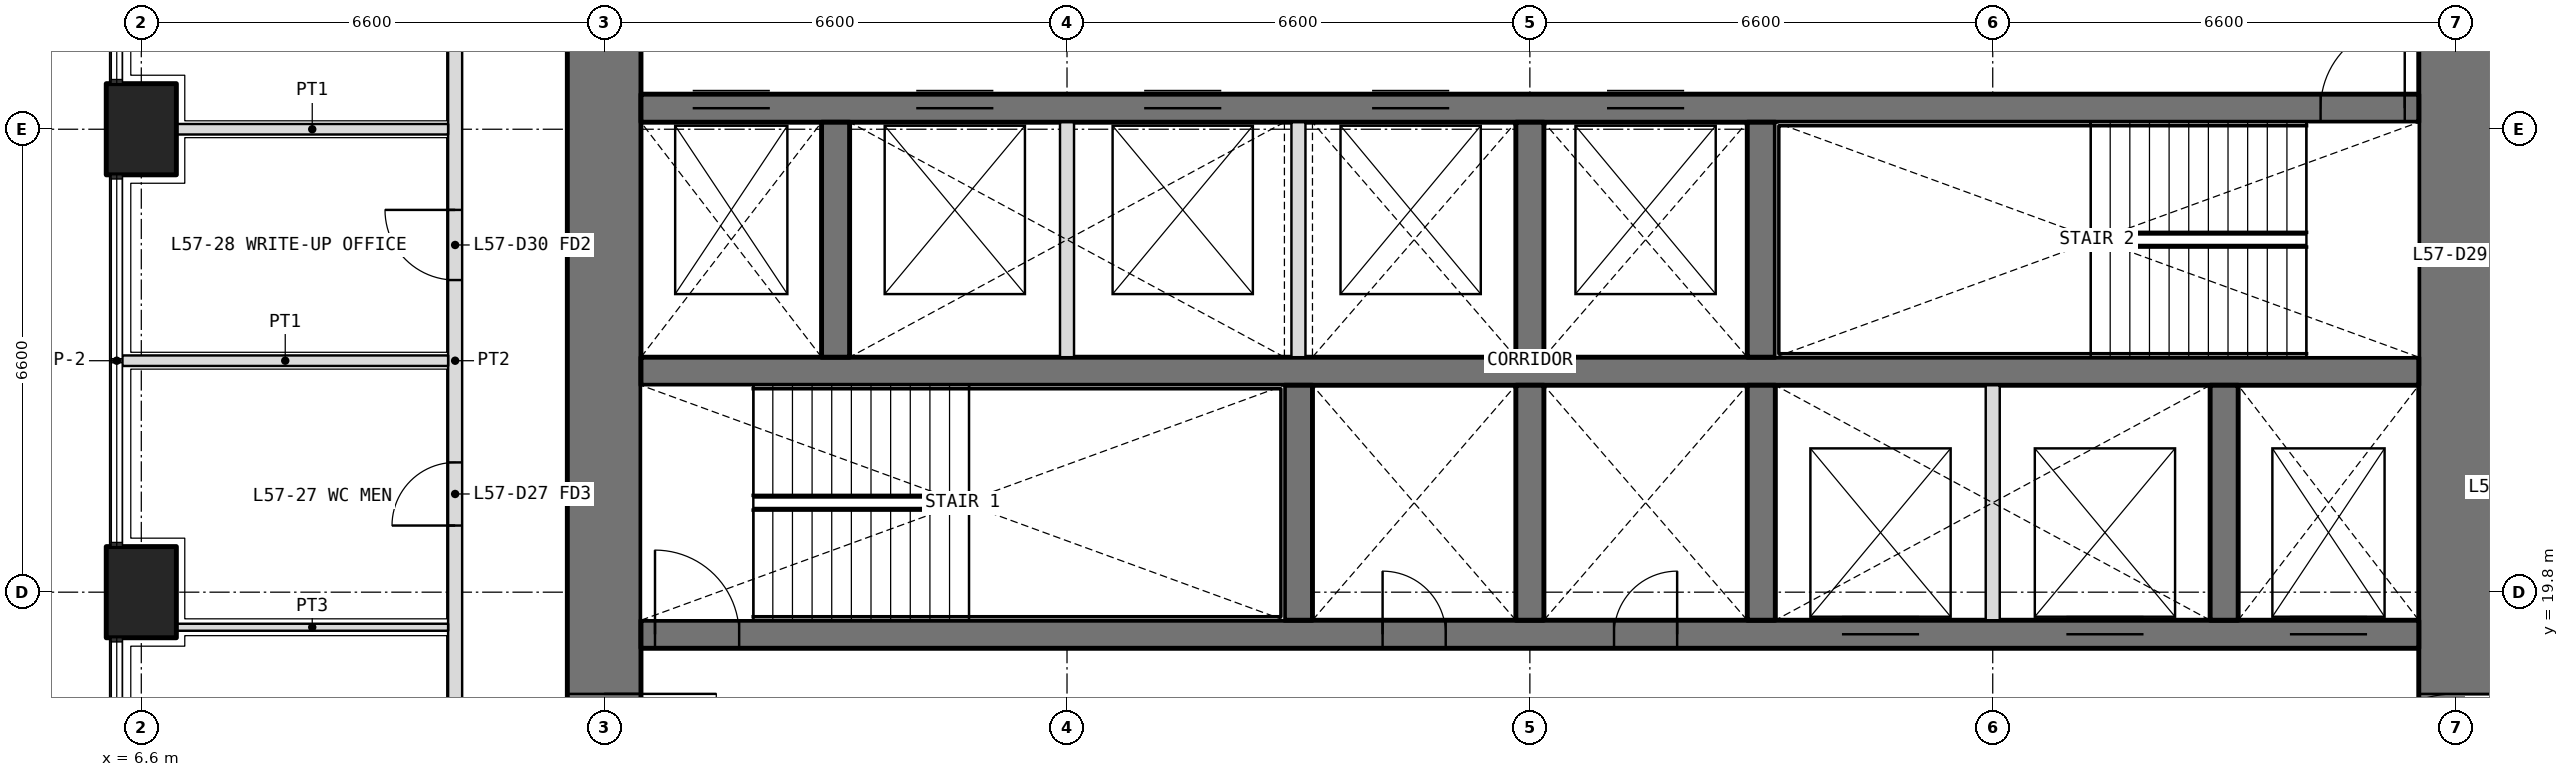
"""IFC4 building model, lengths in metres.
Left out: names, types, materials, properties, quantities, classifications, styles, units other than length and angle.
Written with IfcOpenShell. Run it as: python <this file> out.ifc"""

import sys

from ifc_helpers import new_model, si_unit, direction, frame, frame_2d, origin, origin_2d, place, context, subcontext, project, spatial, rectangle, extrude, element, fill, save


model = new_model("IFC4")
c1 = context("Model", 3, precision=1e-05, world=origin(), true_north=direction((0.0, 1.0)))
c2 = subcontext(c1, "Body", "Model", "MODEL_VIEW")
j1 = project(units=[si_unit("LENGTHUNIT", "METRE"), si_unit("PLANEANGLEUNIT", "RADIAN")], contexts=[c1])
p1 = place(None, origin())
s1 = spatial("IfcSite", under=j1, at=p1, CompositionType="ELEMENT")
p2 = place(p1, origin())
s2 = spatial("IfcBuilding", under=s1, at=p2, CompositionType="ELEMENT")
p3 = place(p2, frame((0.0, 0.0, 250.2)))
s3 = spatial("IfcBuildingStorey", under=s2, at=p3, CompositionType="ELEMENT", Elevation=250.2)
for number, where, z_axis, x_axis in (
    (1, (6.6, 19.8, 0.0), (0.0, 0.0, 1.0), (0.0, 1.0, 0.0)),
    (2, (6.6, 26.4, 0.0), (0.0, 0.0, 1.0), (0.0, 1.0, 0.0)),
):
    element("IfcColumn", number, at=place(p3, frame(where, z_axis=z_axis, x_axis=x_axis)), inside=s3, PredefinedType="COLUMN", context=c2, shape_type="SweptSolid", body=[
        extrude(rectangle(XDim=1.3, YDim=1.0, at=origin_2d()), origin(), (0.0, 0.0, 1.0), 4.2),
    ])
p4 = place(p3, frame((39.6, 13.725, 0.0), z_axis=(0.0, 0.0, 1.0), x_axis=(0.0, 1.0, 0.0)))
e3 = element("IfcWall", 3, at=p4, inside=s3, PredefinedType="SHEAR", context=c2, shape_type="SweptSolid", body=[
    extrude(rectangle(XDim=18.75, YDim=1.05, at=frame_2d((9.375, 0.0))), origin(), (0.0, 0.0, 1.0), 4.2),
])
p5 = place(p4, frame((3.025, 0.0, 0.0)))
e4 = element("IfcOpeningElement", 4, at=p5, cuts=e3, PredefinedType="OPENING", context=c2, shape_type="SweptSolid", body=[
    extrude(rectangle(XDim=1.6, YDim=2.1, at=frame_2d((0.8, 1.05))), frame((0.0, 0.535, 0.0), z_axis=(0.0, -1.0, 0.0), x_axis=(1.0, 0.0, 0.0)), (0.0, 0.0, 1.0), 1.07),
])
p6 = place(p4, frame((13.825, 0.0, 0.0)))
e5 = element("IfcOpeningElement", 5, at=p6, cuts=e3, PredefinedType="OPENING", context=c2, shape_type="SweptSolid", body=[
    extrude(rectangle(XDim=1.6, YDim=2.1, at=frame_2d((0.8, 1.05))), frame((0.0, 0.535, 0.0), z_axis=(0.0, -1.0, 0.0), x_axis=(1.0, 0.0, 0.0)), (0.0, 0.0, 1.0), 1.07),
])
p7 = place(p3, frame((13.2, 32.475, 0.0), z_axis=(0.0, 0.0, 1.0), x_axis=(0.0, -1.0, 0.0)))
e6 = element("IfcWall", 6, at=p7, inside=s3, PredefinedType="SHEAR", context=c2, shape_type="SweptSolid", body=[
    extrude(rectangle(XDim=18.75, YDim=1.05, at=frame_2d((9.375, 0.0))), origin(), (0.0, 0.0, 1.0), 4.2),
])
p8 = place(p7, frame((14.125, 0.0, 0.0)))
e7 = element("IfcOpeningElement", 7, at=p8, cuts=e6, PredefinedType="OPENING", context=c2, shape_type="SweptSolid", body=[
    extrude(rectangle(XDim=1.6, YDim=2.1, at=frame_2d((0.8, 1.05))), frame((0.0, 0.535, 0.0), z_axis=(0.0, -1.0, 0.0), x_axis=(1.0, 0.0, 0.0)), (0.0, 0.0, 1.0), 1.07),
])
p9 = place(p7, frame((3.325, 0.0, 0.0)))
e8 = element("IfcOpeningElement", 8, at=p9, cuts=e6, PredefinedType="OPENING", context=c2, shape_type="SweptSolid", body=[
    extrude(rectangle(XDim=1.6, YDim=2.1, at=frame_2d((0.8, 1.05))), frame((0.0, 0.535, 0.0), z_axis=(0.0, -1.0, 0.0), x_axis=(1.0, 0.0, 0.0)), (0.0, 0.0, 1.0), 1.07),
])
p10 = place(p3, frame((13.725, 19.2, 0.0), z_axis=(0.0, 0.0, 1.0), x_axis=(1.0, 0.0, 0.0)))
e9 = element("IfcWall", 9, at=p10, inside=s3, PredefinedType="SHEAR", context=c2, shape_type="SweptSolid", body=[
    extrude(rectangle(XDim=25.35, YDim=0.4, at=frame_2d((12.675, 0.0))), origin(), (0.0, 0.0, 1.0), 4.2),
])
p11 = place(p10, frame((10.575, 0.0, 0.0)))
e10 = element("IfcOpeningElement", 10, at=p11, cuts=e9, PredefinedType="OPENING", context=c2, shape_type="SweptSolid", body=[
    extrude(rectangle(XDim=0.9, YDim=2.1, at=frame_2d((0.45, 1.05))), frame((0.0, 0.21, 0.0), z_axis=(0.0, -1.0, 0.0), x_axis=(1.0, 0.0, 0.0)), (0.0, 0.0, 1.0), 0.42),
])
p12 = place(p10, frame((13.875, 0.0, 0.0)))
e11 = element("IfcOpeningElement", 11, at=p12, cuts=e9, PredefinedType="OPENING", context=c2, shape_type="SweptSolid", body=[
    extrude(rectangle(XDim=0.9, YDim=2.1, at=frame_2d((0.45, 1.05))), frame((0.0, 0.21, 0.0), z_axis=(0.0, -1.0, 0.0), x_axis=(1.0, 0.0, 0.0)), (0.0, 0.0, 1.0), 0.42),
])
p13 = place(p10, frame((0.2, 0.0, 0.0)))
e12 = element("IfcOpeningElement", 12, at=p13, cuts=e9, PredefinedType="OPENING", context=c2, shape_type="SweptSolid", body=[
    extrude(rectangle(XDim=1.2, YDim=2.1, at=frame_2d((0.6, 1.05))), frame((0.0, 0.21, 0.0), z_axis=(0.0, -1.0, 0.0), x_axis=(1.0, 0.0, 0.0)), (0.0, 0.0, 1.0), 0.42),
])
p14 = place(p10, frame((23.512, 0.0, 0.0)))
e13 = element("IfcOpeningElement", 13, at=p14, cuts=e9, PredefinedType="OPENING", context=c2, shape_type="SweptSolid", body=[
    extrude(rectangle(XDim=1.1, YDim=2.1, at=frame_2d((0.55, 1.05))), frame((0.0, 0.21, 0.0), z_axis=(0.0, -1.0, 0.0), x_axis=(1.0, 0.0, 0.0)), (0.0, 0.0, 1.0), 0.42),
])
p15 = place(p10, frame((17.125, 0.0, 0.0)))
e14 = element("IfcOpeningElement", 14, at=p15, cuts=e9, PredefinedType="OPENING", context=c2, shape_type="SweptSolid", body=[
    extrude(rectangle(XDim=1.1, YDim=2.1, at=frame_2d((0.55, 1.05))), frame((0.0, 0.21, 0.0), z_axis=(0.0, -1.0, 0.0), x_axis=(1.0, 0.0, 0.0)), (0.0, 0.0, 1.0), 0.42),
])
p16 = place(p10, frame((20.325, 0.0, 0.0)))
e15 = element("IfcOpeningElement", 15, at=p16, cuts=e9, PredefinedType="OPENING", context=c2, shape_type="SweptSolid", body=[
    extrude(rectangle(XDim=1.1, YDim=2.1, at=frame_2d((0.55, 1.05))), frame((0.0, 0.21, 0.0), z_axis=(0.0, -1.0, 0.0), x_axis=(1.0, 0.0, 0.0)), (0.0, 0.0, 1.0), 0.42),
])
p17 = place(p3, frame((13.725, 22.95, 0.0), z_axis=(0.0, 0.0, 1.0), x_axis=(1.0, 0.0, 0.0)))
e16 = element("IfcWall", 16, at=p17, inside=s3, PredefinedType="SHEAR", context=c2, shape_type="SweptSolid", body=[
    extrude(rectangle(XDim=25.35, YDim=0.4, at=frame_2d((12.675, 0.0))), origin(), (0.0, 0.0, 1.0), 4.2),
])
p18 = place(p3, frame((13.725, 26.7, 0.0), z_axis=(0.0, 0.0, 1.0), x_axis=(1.0, 0.0, 0.0)))
e17 = element("IfcWall", 17, at=p18, inside=s3, PredefinedType="SHEAR", context=c2, shape_type="SweptSolid", body=[
    extrude(rectangle(XDim=25.35, YDim=0.4, at=frame_2d((12.675, 0.0))), origin(), (0.0, 0.0, 1.0), 4.2),
])
p19 = place(p18, frame((23.95, 0.0, 0.0)))
e18 = element("IfcOpeningElement", 18, at=p19, cuts=e17, PredefinedType="OPENING", context=c2, shape_type="SweptSolid", body=[
    extrude(rectangle(XDim=1.2, YDim=2.1, at=frame_2d((0.6, 1.05))), frame((0.0, 0.21, 0.0), z_axis=(0.0, -1.0, 0.0), x_axis=(1.0, 0.0, 0.0)), (0.0, 0.0, 1.0), 0.42),
])
p20 = place(p18, frame((0.738, 0.0, 0.0)))
e19 = element("IfcOpeningElement", 19, at=p20, cuts=e17, PredefinedType="OPENING", context=c2, shape_type="SweptSolid", body=[
    extrude(rectangle(XDim=1.1, YDim=2.1, at=frame_2d((0.55, 1.05))), frame((0.0, 0.21, 0.0), z_axis=(0.0, -1.0, 0.0), x_axis=(1.0, 0.0, 0.0)), (0.0, 0.0, 1.0), 0.42),
])
p21 = place(p18, frame((3.925, 0.0, 0.0)))
e20 = element("IfcOpeningElement", 20, at=p21, cuts=e17, PredefinedType="OPENING", context=c2, shape_type="SweptSolid", body=[
    extrude(rectangle(XDim=1.1, YDim=2.1, at=frame_2d((0.55, 1.05))), frame((0.0, 0.21, 0.0), z_axis=(0.0, -1.0, 0.0), x_axis=(1.0, 0.0, 0.0)), (0.0, 0.0, 1.0), 0.42),
])
p22 = place(p18, frame((7.175, 0.0, 0.0)))
e21 = element("IfcOpeningElement", 21, at=p22, cuts=e17, PredefinedType="OPENING", context=c2, shape_type="SweptSolid", body=[
    extrude(rectangle(XDim=1.1, YDim=2.1, at=frame_2d((0.55, 1.05))), frame((0.0, 0.21, 0.0), z_axis=(0.0, -1.0, 0.0), x_axis=(1.0, 0.0, 0.0)), (0.0, 0.0, 1.0), 0.42),
])
p23 = place(p18, frame((10.425, 0.0, 0.0)))
e22 = element("IfcOpeningElement", 22, at=p23, cuts=e17, PredefinedType="OPENING", context=c2, shape_type="SweptSolid", body=[
    extrude(rectangle(XDim=1.1, YDim=2.1, at=frame_2d((0.55, 1.05))), frame((0.0, 0.21, 0.0), z_axis=(0.0, -1.0, 0.0), x_axis=(1.0, 0.0, 0.0)), (0.0, 0.0, 1.0), 0.42),
])
p24 = place(p18, frame((13.775, 0.0, 0.0)))
e23 = element("IfcOpeningElement", 23, at=p24, cuts=e17, PredefinedType="OPENING", context=c2, shape_type="SweptSolid", body=[
    extrude(rectangle(XDim=1.1, YDim=2.1, at=frame_2d((0.55, 1.05))), frame((0.0, 0.21, 0.0), z_axis=(0.0, -1.0, 0.0), x_axis=(1.0, 0.0, 0.0)), (0.0, 0.0, 1.0), 0.42),
])
for number, where, z_axis, x_axis in (
    (24, (23.1, 19.4, 0.0), (0.0, 0.0, 1.0), (0.0, 1.0, 0.0)),
    (25, (26.4, 19.4, 0.0), (0.0, 0.0, 1.0), (0.0, 1.0, 0.0)),
    (26, (29.7, 19.4, 0.0), (0.0, 0.0, 1.0), (0.0, 1.0, 0.0)),
    (27, (36.3, 19.4, 0.0), (0.0, 0.0, 1.0), (0.0, 1.0, 0.0)),
    (28, (16.5, 23.15, 0.0), (0.0, 0.0, 1.0), (0.0, 1.0, 0.0)),
    (29, (26.4, 23.15, 0.0), (0.0, 0.0, 1.0), (0.0, 1.0, 0.0)),
    (30, (29.7, 23.15, 0.0), (0.0, 0.0, 1.0), (0.0, 1.0, 0.0)),
):
    element("IfcWall", number, at=place(p3, frame(where, z_axis=z_axis, x_axis=x_axis)), inside=s3, PredefinedType="SHEAR", context=c2, shape_type="SweptSolid", body=[
        extrude(rectangle(XDim=3.35, YDim=0.4, at=frame_2d((1.675, 0.0))), origin(), (0.0, 0.0, 1.0), 4.2),
    ])
for number, where, z_axis, x_axis in (
    (31, (33.0, 19.4, 0.0), (0.0, 0.0, 1.0), (0.0, 1.0, 0.0)),
    (32, (19.8, 23.15, 0.0), (0.0, 0.0, 1.0), (0.0, 1.0, 0.0)),
    (33, (23.1, 23.15, 0.0), (0.0, 0.0, 1.0), (0.0, 1.0, 0.0)),
):
    element("IfcWall", number, at=place(p3, frame(where, z_axis=z_axis, x_axis=x_axis)), inside=s3, PredefinedType="PARTITIONING", context=c2, shape_type="SweptSolid", body=[
        extrude(rectangle(XDim=3.35, YDim=0.2, at=frame_2d((1.675, 0.0))), origin(), (0.0, 0.0, 1.0), 4.2),
    ])
p25 = place(p3, frame((11.075, 7.4, 0.0), z_axis=(0.0, 0.0, 1.0), x_axis=(0.0, 1.0, 0.0)))
e34 = element("IfcWall", 34, at=p25, inside=s3, PredefinedType="PARTITIONING", context=c2, shape_type="SweptSolid", body=[
    extrude(rectangle(XDim=31.4, YDim=0.2, at=frame_2d((15.7, 0.0))), origin(), (0.0, 0.0, 1.0), 3.0),
])
p26 = place(p25, frame((2.35, 0.0, 0.0)))
e35 = element("IfcOpeningElement", 35, at=p26, cuts=e34, PredefinedType="OPENING", context=c2, shape_type="SweptSolid", body=[
    extrude(rectangle(XDim=1.0, YDim=2.1, at=frame_2d((0.5, 1.05))), frame((0.0, 0.11, 0.0), z_axis=(0.0, -1.0, 0.0), x_axis=(1.0, 0.0, 0.0)), (0.0, 0.0, 1.0), 0.22),
])
p27 = place(p25, frame((6.35, 0.0, 0.0)))
e36 = element("IfcOpeningElement", 36, at=p27, cuts=e34, PredefinedType="OPENING", context=c2, shape_type="SweptSolid", body=[
    extrude(rectangle(XDim=1.0, YDim=2.1, at=frame_2d((0.5, 1.05))), frame((0.0, 0.11, 0.0), z_axis=(0.0, -1.0, 0.0), x_axis=(1.0, 0.0, 0.0)), (0.0, 0.0, 1.0), 0.22),
])
p28 = place(p25, frame((9.45, 0.0, 0.0)))
e37 = element("IfcOpeningElement", 37, at=p28, cuts=e34, PredefinedType="OPENING", context=c2, shape_type="SweptSolid", body=[
    extrude(rectangle(XDim=0.9, YDim=2.1, at=frame_2d((0.45, 1.05))), frame((0.0, 0.11, 0.0), z_axis=(0.0, -1.0, 0.0), x_axis=(1.0, 0.0, 0.0)), (0.0, 0.0, 1.0), 0.22),
])
p29 = place(p25, frame((13.35, 0.0, 0.0)))
e38 = element("IfcOpeningElement", 38, at=p29, cuts=e34, PredefinedType="OPENING", context=c2, shape_type="SweptSolid", body=[
    extrude(rectangle(XDim=0.9, YDim=2.1, at=frame_2d((0.45, 1.05))), frame((0.0, 0.11, 0.0), z_axis=(0.0, -1.0, 0.0), x_axis=(1.0, 0.0, 0.0)), (0.0, 0.0, 1.0), 0.22),
])
p30 = place(p25, frame((16.85, 0.0, 0.0)))
e39 = element("IfcOpeningElement", 39, at=p30, cuts=e34, PredefinedType="OPENING", context=c2, shape_type="SweptSolid", body=[
    extrude(rectangle(XDim=1.0, YDim=2.1, at=frame_2d((0.5, 1.05))), frame((0.0, 0.11, 0.0), z_axis=(0.0, -1.0, 0.0), x_axis=(1.0, 0.0, 0.0)), (0.0, 0.0, 1.0), 0.22),
])
p31 = place(p25, frame((24.75, 0.0, 0.0)))
e40 = element("IfcOpeningElement", 40, at=p31, cuts=e34, PredefinedType="OPENING", context=c2, shape_type="SweptSolid", body=[
    extrude(rectangle(XDim=1.0, YDim=2.1, at=frame_2d((0.5, 1.05))), frame((0.0, 0.11, 0.0), z_axis=(0.0, -1.0, 0.0), x_axis=(1.0, 0.0, 0.0)), (0.0, 0.0, 1.0), 0.22),
])
p32 = place(p3, frame((7.1, 19.3, 0.0), z_axis=(0.0, 0.0, 1.0), x_axis=(1.0, 0.0, 0.0)))
e41 = element("IfcWall", 41, at=p32, inside=s3, PredefinedType="PARTITIONING", context=c2, shape_type="SweptSolid", body=[
    extrude(rectangle(XDim=3.875, YDim=0.1, at=frame_2d((1.938, 0.0))), origin(), (0.0, 0.0, 1.0), 3.0),
])
p33 = place(p3, frame((6.33, 23.1, 0.0), z_axis=(0.0, 0.0, 1.0), x_axis=(1.0, 0.0, 0.0)))
e42 = element("IfcWall", 42, at=p33, inside=s3, PredefinedType="PARTITIONING", context=c2, shape_type="SweptSolid", body=[
    extrude(rectangle(XDim=4.645, YDim=0.15, at=frame_2d((2.323, 0.0))), origin(), (0.0, 0.0, 1.0), 2.7),
])
p34 = place(p3, frame((7.1, 26.4, 0.0), z_axis=(0.0, 0.0, 1.0), x_axis=(1.0, 0.0, 0.0)))
e43 = element("IfcWall", 43, at=p34, inside=s3, PredefinedType="PARTITIONING", context=c2, shape_type="SweptSolid", body=[
    extrude(rectangle(XDim=3.875, YDim=0.15, at=frame_2d((1.938, 0.0))), origin(), (0.0, 0.0, 1.0), 3.0),
])
p35 = place(p29, origin())
e44 = element("IfcDoor", 44, at=p35, inside=s3, OperationType="SINGLE_SWING_LEFT", PredefinedType="DOOR", context=c2, shape_type="SweptSolid", body=[
    extrude(rectangle(XDim=0.9, YDim=2.1, at=frame_2d((0.45, 1.05))), frame((0.0, 0.025, 0.0), z_axis=(0.0, -1.0, 0.0), x_axis=(1.0, 0.0, 0.0)), (0.0, 0.0, 1.0), 0.05),
])
fill(e38, e44)
p36 = place(p30, origin())
e45 = element("IfcDoor", 45, at=p36, inside=s3, OperationType="SINGLE_SWING_RIGHT", PredefinedType="DOOR", context=c2, shape_type="SweptSolid", body=[
    extrude(rectangle(XDim=1.0, YDim=2.1, at=frame_2d((0.5, 1.05))), frame((0.0, 0.025, 0.0), z_axis=(0.0, -1.0, 0.0), x_axis=(1.0, 0.0, 0.0)), (0.0, 0.0, 1.0), 0.05),
])
fill(e39, e45)
p37 = place(p11, origin())
e46 = element("IfcDoor", 46, at=p37, inside=s3, OperationType="SINGLE_SWING_LEFT", PredefinedType="DOOR", context=c2, shape_type="SweptSolid", body=[
    extrude(rectangle(XDim=0.9, YDim=2.1, at=frame_2d((0.45, 1.05))), frame((0.0, 0.025, 0.0), z_axis=(0.0, -1.0, 0.0), x_axis=(1.0, 0.0, 0.0)), (0.0, 0.0, 1.0), 0.05),
])
fill(e10, e46)
p38 = place(p12, origin())
e47 = element("IfcDoor", 47, at=p38, inside=s3, OperationType="SINGLE_SWING_RIGHT", PredefinedType="DOOR", context=c2, shape_type="SweptSolid", body=[
    extrude(rectangle(XDim=0.9, YDim=2.1, at=frame_2d((0.45, 1.05))), frame((0.0, 0.025, 0.0), z_axis=(0.0, -1.0, 0.0), x_axis=(1.0, 0.0, 0.0)), (0.0, 0.0, 1.0), 0.05),
])
fill(e11, e47)
p39 = place(p13, origin())
e48 = element("IfcDoor", 48, at=p39, inside=s3, OperationType="SINGLE_SWING_LEFT", PredefinedType="DOOR", context=c2, shape_type="SweptSolid", body=[
    extrude(rectangle(XDim=1.2, YDim=2.1, at=frame_2d((0.6, 1.05))), frame((0.0, 0.025, 0.0), z_axis=(0.0, -1.0, 0.0), x_axis=(1.0, 0.0, 0.0)), (0.0, 0.0, 1.0), 0.05),
])
fill(e12, e48)
p40 = place(p19, origin())
e49 = element("IfcDoor", 49, at=p40, inside=s3, OperationType="SINGLE_SWING_RIGHT", PredefinedType="DOOR", context=c2, shape_type="SweptSolid", body=[
    extrude(rectangle(XDim=1.2, YDim=2.1, at=frame_2d((0.6, 1.05))), frame((0.0, 0.025, 0.0), z_axis=(0.0, -1.0, 0.0), x_axis=(1.0, 0.0, 0.0)), (0.0, 0.0, 1.0), 0.05),
])
fill(e18, e49)
p41 = place(p8, origin())
e50 = element("IfcDoor", 50, at=p41, inside=s3, OperationType="DOUBLE_DOOR_DOUBLE_SWING", PredefinedType="DOOR", context=c2, shape_type="SweptSolid", body=[
    extrude(rectangle(XDim=1.6, YDim=2.1, at=frame_2d((0.8, 1.05))), frame((0.0, 0.025, 0.0), z_axis=(0.0, -1.0, 0.0), x_axis=(1.0, 0.0, 0.0)), (0.0, 0.0, 1.0), 0.05),
])
fill(e7, e50)
p42 = place(p5, origin())
e51 = element("IfcDoor", 51, at=p42, inside=s3, OperationType="DOUBLE_DOOR_DOUBLE_SWING", PredefinedType="DOOR", context=c2, shape_type="SweptSolid", body=[
    extrude(rectangle(XDim=1.6, YDim=2.1, at=frame_2d((0.8, 1.05))), frame((0.0, 0.025, 0.0), z_axis=(0.0, -1.0, 0.0), x_axis=(1.0, 0.0, 0.0)), (0.0, 0.0, 1.0), 0.05),
])
fill(e4, e51)
p43 = place(p20, origin())
e52 = element("IfcDoor", 52, at=p43, inside=s3, OperationType="DOUBLE_DOOR_SLIDING", PredefinedType="DOOR", context=c2, shape_type="SweptSolid", body=[
    extrude(rectangle(XDim=1.1, YDim=2.1, at=frame_2d((0.55, 1.05))), frame((0.0, 0.025, 0.0), z_axis=(0.0, -1.0, 0.0), x_axis=(1.0, 0.0, 0.0)), (0.0, 0.0, 1.0), 0.05),
])
fill(e19, e52)
p44 = place(p14, origin())
e53 = element("IfcDoor", 53, at=p44, inside=s3, OperationType="DOUBLE_DOOR_SLIDING", PredefinedType="DOOR", context=c2, shape_type="SweptSolid", body=[
    extrude(rectangle(XDim=1.1, YDim=2.1, at=frame_2d((0.55, 1.05))), frame((0.0, 0.025, 0.0), z_axis=(0.0, -1.0, 0.0), x_axis=(1.0, 0.0, 0.0)), (0.0, 0.0, 1.0), 0.05),
])
fill(e13, e53)
p45 = place(p15, origin())
e54 = element("IfcDoor", 54, at=p45, inside=s3, OperationType="DOUBLE_DOOR_SLIDING", PredefinedType="DOOR", context=c2, shape_type="SweptSolid", body=[
    extrude(rectangle(XDim=1.1, YDim=2.1, at=frame_2d((0.55, 1.05))), frame((0.0, 0.025, 0.0), z_axis=(0.0, -1.0, 0.0), x_axis=(1.0, 0.0, 0.0)), (0.0, 0.0, 1.0), 0.05),
])
fill(e14, e54)
p46 = place(p16, origin())
e55 = element("IfcDoor", 55, at=p46, inside=s3, OperationType="DOUBLE_DOOR_SLIDING", PredefinedType="DOOR", context=c2, shape_type="SweptSolid", body=[
    extrude(rectangle(XDim=1.1, YDim=2.1, at=frame_2d((0.55, 1.05))), frame((0.0, 0.025, 0.0), z_axis=(0.0, -1.0, 0.0), x_axis=(1.0, 0.0, 0.0)), (0.0, 0.0, 1.0), 0.05),
])
fill(e15, e55)
p47 = place(p21, origin())
e56 = element("IfcDoor", 56, at=p47, inside=s3, OperationType="DOUBLE_DOOR_SLIDING", PredefinedType="DOOR", context=c2, shape_type="SweptSolid", body=[
    extrude(rectangle(XDim=1.1, YDim=2.1, at=frame_2d((0.55, 1.05))), frame((0.0, 0.025, 0.0), z_axis=(0.0, -1.0, 0.0), x_axis=(1.0, 0.0, 0.0)), (0.0, 0.0, 1.0), 0.05),
])
fill(e20, e56)
p48 = place(p22, origin())
e57 = element("IfcDoor", 57, at=p48, inside=s3, OperationType="DOUBLE_DOOR_SLIDING", PredefinedType="DOOR", context=c2, shape_type="SweptSolid", body=[
    extrude(rectangle(XDim=1.1, YDim=2.1, at=frame_2d((0.55, 1.05))), frame((0.0, 0.025, 0.0), z_axis=(0.0, -1.0, 0.0), x_axis=(1.0, 0.0, 0.0)), (0.0, 0.0, 1.0), 0.05),
])
fill(e21, e57)
p49 = place(p23, origin())
e58 = element("IfcDoor", 58, at=p49, inside=s3, OperationType="DOUBLE_DOOR_SLIDING", PredefinedType="DOOR", context=c2, shape_type="SweptSolid", body=[
    extrude(rectangle(XDim=1.1, YDim=2.1, at=frame_2d((0.55, 1.05))), frame((0.0, 0.025, 0.0), z_axis=(0.0, -1.0, 0.0), x_axis=(1.0, 0.0, 0.0)), (0.0, 0.0, 1.0), 0.05),
])
fill(e22, e58)
p50 = place(p24, origin())
e59 = element("IfcDoor", 59, at=p50, inside=s3, OperationType="DOUBLE_DOOR_SLIDING", PredefinedType="DOOR", context=c2, shape_type="SweptSolid", body=[
    extrude(rectangle(XDim=1.1, YDim=2.1, at=frame_2d((0.55, 1.05))), frame((0.0, 0.025, 0.0), z_axis=(0.0, -1.0, 0.0), x_axis=(1.0, 0.0, 0.0)), (0.0, 0.0, 1.0), 0.05),
])
fill(e23, e59)
save(model, sys.argv[1])
